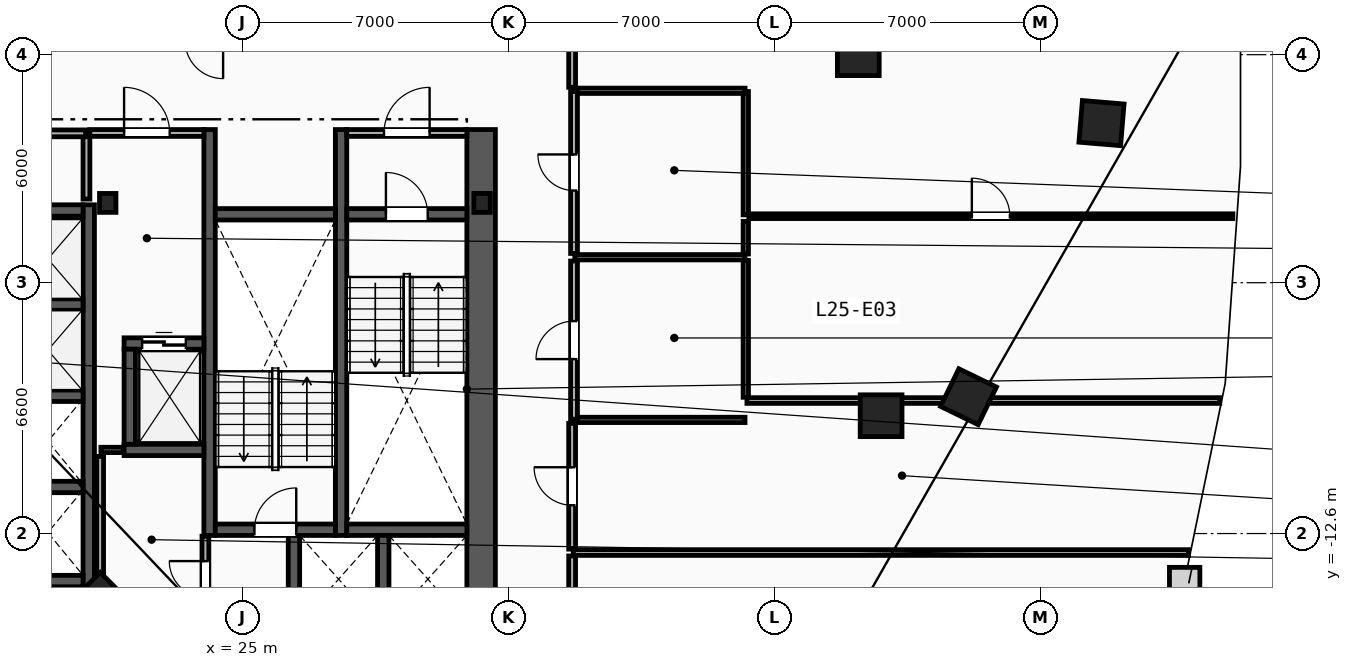
"""IFC4 building model, lengths in metres.
Left out: names, types, materials, properties, quantities, classifications, styles, units other than length and angle.
Written with IfcOpenShell. Run it as: python <this file> out.ifc"""

import sys

from ifc_helpers import new_model, si_unit, direction, frame, frame_2d, origin, origin_2d, place, context, subcontext, project, spatial, rectangle, i_section, extrude, element, fill, save


model = new_model("IFC4")
c1 = context("Model", 3, precision=1e-05, world=origin(), true_north=direction((0.0, 1.0)))
c2 = subcontext(c1, "Body", "Model", "MODEL_VIEW")
j1 = project(units=[si_unit("LENGTHUNIT", "METRE"), si_unit("PLANEANGLEUNIT", "RADIAN")], contexts=[c1])
p1 = place(None, origin())
s1 = spatial("IfcSite", under=j1, at=p1, CompositionType="ELEMENT")
p2 = place(p1, origin())
s2 = spatial("IfcBuilding", under=s1, at=p2, CompositionType="ELEMENT")
p3 = place(p2, frame((0.0, 0.0, 99.8)))
s3 = spatial("IfcBuildingStorey", under=s2, at=p3, CompositionType="ELEMENT", Elevation=99.8)
for number, where, z_axis, x_axis in (
    (1, (31.3, -3.9, 0.0), (0.0, 0.0, 1.0), (1.0, 0.0, 0.0)),
    (2, (21.45, -3.9, 0.0), (0.0, 0.0, 1.0), (1.0, 0.0, 0.0)),
):
    element("IfcColumn", number, at=place(p3, frame(where, z_axis=z_axis, x_axis=x_axis)), inside=s3, PredefinedType="COLUMN", context=c2, shape_type="SweptSolid", body=[
        extrude(i_section(OverallWidth=0.432, OverallDepth=0.498, WebThickness=0.056, FlangeThickness=0.089, FilletRadius=0.018, at=origin_2d()), origin(), (0.0, 0.0, 1.0), 3.6),
    ])
for number, where, z_axis, x_axis in (
    (3, (41.2, 0.0, 0.0), (0.0, 0.0, 1.0), (1.0, 0.0, 0.0)),
    (4, (41.8, -9.5, 0.0), (0.0, 0.0, 1.0), (1.0, 0.0, 0.0)),
    (5, (21.25, -14.4, 0.0), (0.0, 0.0, 1.0), (0.703, -0.711, 0.0)),
    (6, (44.1, -9.0, 0.0), (0.0, 0.0, 1.0), (0.437, 0.899, 0.0)),
    (7, (47.6, -1.8, 0.0), (0.0, 0.0, 1.0), (0.084, 0.997, 0.0)),
):
    element("IfcColumn", number, at=place(p3, frame(where, z_axis=z_axis, x_axis=x_axis)), inside=s3, PredefinedType="COLUMN", context=c2, shape_type="SweptSolid", body=[
        extrude(rectangle(XDim=1.1, YDim=1.1, at=origin_2d()), origin(), (0.0, 0.0, 1.0), 3.6),
    ])
p4 = place(p3, frame((31.275, -15.3, 0.0), z_axis=(0.0, 0.0, 1.0), x_axis=(0.0, 1.0, 0.0)))
e8 = element("IfcWall", 8, at=p4, inside=s3, PredefinedType="SHEAR", context=c2, shape_type="SweptSolid", body=[
    extrude(rectangle(XDim=13.33, YDim=0.75, at=frame_2d((6.665, 0.0))), origin(), (0.0, 0.0, 1.0), 3.3),
])
for number, where, z_axis, x_axis in (
    (9, (27.59, -12.65, 0.0), (0.0, 0.0, 1.0), (0.0, 1.0, 0.0)),
    (10, (24.13, -12.65, 0.0), (0.0, 0.0, 1.0), (0.0, 1.0, 0.0)),
):
    element("IfcWall", number, at=place(p3, frame(where, z_axis=z_axis, x_axis=x_axis)), inside=s3, PredefinedType="SHEAR", context=c2, shape_type="SweptSolid", body=[
        extrude(rectangle(XDim=10.68, YDim=0.3, at=frame_2d((5.34, 0.0))), origin(), (0.0, 0.0, 1.0), 3.3),
    ])
p5 = place(p3, frame((27.74, -4.2, 0.0), z_axis=(0.0, 0.0, 1.0), x_axis=(1.0, 0.0, 0.0)))
e11 = element("IfcWall", 11, at=p5, inside=s3, PredefinedType="SHEAR", context=c2, shape_type="SweptSolid", body=[
    extrude(rectangle(XDim=3.16, YDim=0.3, at=frame_2d((1.58, 0.0))), origin(), (0.0, 0.0, 1.0), 3.3),
])
p6 = place(p5, frame((1.03, 0.0, 0.0)))
e12 = element("IfcOpeningElement", 12, at=p6, cuts=e11, PredefinedType="OPENING", context=c2, shape_type="SweptSolid", body=[
    extrude(rectangle(XDim=1.1, YDim=2.15, at=frame_2d((0.55, 1.075))), frame((0.0, 0.16, 0.0), z_axis=(0.0, -1.0, 0.0), x_axis=(1.0, 0.0, 0.0)), (0.0, 0.0, 1.0), 0.32),
])
p7 = place(p3, frame((27.74, -12.5, 0.0), z_axis=(0.0, 0.0, 1.0), x_axis=(1.0, 0.0, 0.0)))
e13 = element("IfcWall", 13, at=p7, inside=s3, PredefinedType="SHEAR", context=c2, shape_type="SweptSolid", body=[
    extrude(rectangle(XDim=3.16, YDim=0.3, at=frame_2d((1.58, 0.0))), origin(), (0.0, 0.0, 1.0), 3.3),
])
p8 = place(p3, frame((24.28, -12.5, 0.0), z_axis=(0.0, 0.0, 1.0), x_axis=(1.0, 0.0, 0.0)))
e14 = element("IfcWall", 14, at=p8, inside=s3, PredefinedType="SHEAR", context=c2, shape_type="SweptSolid", body=[
    extrude(rectangle(XDim=3.16, YDim=0.3, at=frame_2d((1.58, 0.0))), origin(), (0.0, 0.0, 1.0), 3.3),
])
p9 = place(p8, frame((1.03, 0.0, 0.0)))
e15 = element("IfcOpeningElement", 15, at=p9, cuts=e14, PredefinedType="OPENING", context=c2, shape_type="SweptSolid", body=[
    extrude(rectangle(XDim=1.1, YDim=2.15, at=frame_2d((0.55, 1.075))), frame((0.0, 0.16, 0.0), z_axis=(0.0, -1.0, 0.0), x_axis=(1.0, 0.0, 0.0)), (0.0, 0.0, 1.0), 0.32),
])
p10 = place(p3, frame((24.28, -4.2, 0.0), z_axis=(0.0, 0.0, 1.0), x_axis=(1.0, 0.0, 0.0)))
e16 = element("IfcWall", 16, at=p10, inside=s3, PredefinedType="SHEAR", context=c2, shape_type="SweptSolid", body=[
    extrude(rectangle(XDim=3.16, YDim=0.3, at=frame_2d((1.58, 0.0))), origin(), (0.0, 0.0, 1.0), 3.3),
])
p11 = place(p3, frame((20.89, -3.8, 0.0), z_axis=(0.0, 0.0, 1.0), x_axis=(0.0, 1.0, 0.0)))
e17 = element("IfcWall", 17, at=p11, inside=s3, PredefinedType="PARTITIONING", context=c2, shape_type="SweptSolid", body=[
    extrude(rectangle(XDim=1.65, YDim=0.18, at=frame_2d((0.825, 0.0))), origin(), (0.0, 0.0, 1.0), 3.3),
])
p12 = place(p3, frame((20.98, -2.06, 0.0), z_axis=(0.0, 0.0, 1.0), x_axis=(1.0, 0.0, 0.0)))
e18 = element("IfcWall", 18, at=p12, inside=s3, PredefinedType="PARTITIONING", context=c2, shape_type="SweptSolid", body=[
    extrude(rectangle(XDim=3.0, YDim=0.18, at=frame_2d((1.5, 0.0))), origin(), (0.0, 0.0, 1.0), 3.3),
])
p13 = place(p12, frame((0.9, 0.0, 0.0)))
e19 = element("IfcOpeningElement", 19, at=p13, cuts=e18, PredefinedType="OPENING", context=c2, shape_type="SweptSolid", body=[
    extrude(rectangle(XDim=1.2, YDim=2.15, at=frame_2d((0.6, 1.075))), frame((0.0, 0.1, 0.0), z_axis=(0.0, -1.0, 0.0), x_axis=(1.0, 0.0, 0.0)), (0.0, 0.0, 1.0), 0.2),
])
p14 = place(p3, frame((27.74, -2.06, 0.0), z_axis=(0.0, 0.0, 1.0), x_axis=(1.0, 0.0, 0.0)))
e20 = element("IfcWall", 20, at=p14, inside=s3, PredefinedType="PARTITIONING", context=c2, shape_type="SweptSolid", body=[
    extrude(rectangle(XDim=3.16, YDim=0.18, at=frame_2d((1.58, 0.0))), origin(), (0.0, 0.0, 1.0), 3.3),
])
p15 = place(p14, frame((0.98, 0.0, 0.0)))
e21 = element("IfcOpeningElement", 21, at=p15, cuts=e20, PredefinedType="OPENING", context=c2, shape_type="SweptSolid", body=[
    extrude(rectangle(XDim=1.2, YDim=2.15, at=frame_2d((0.6, 1.075))), frame((0.0, 0.1, 0.0), z_axis=(0.0, -1.0, 0.0), x_axis=(1.0, 0.0, 0.0)), (0.0, 0.0, 1.0), 0.2),
])
p16 = place(p3, frame((21.88, -7.6, 0.0), z_axis=(0.0, 0.0, 1.0), x_axis=(1.0, 0.0, 0.0)))
e22 = element("IfcWall", 22, at=p16, inside=s3, PredefinedType="SHEAR", context=c2, shape_type="SweptSolid", body=[
    extrude(rectangle(XDim=2.1, YDim=0.3, at=frame_2d((1.05, 0.0))), origin(), (0.0, 0.0, 1.0), 3.3),
])
p17 = place(p16, frame((0.475, 0.0, 0.0)))
e23 = element("IfcOpeningElement", 23, at=p17, cuts=e22, PredefinedType="OPENING", context=c2, shape_type="SweptSolid", body=[
    extrude(rectangle(XDim=1.15, YDim=2.2, at=frame_2d((0.575, 1.1))), frame((0.0, 0.16, 0.0), z_axis=(0.0, -1.0, 0.0), x_axis=(1.0, 0.0, 0.0)), (0.0, 0.0, 1.0), 0.32),
])
p18 = place(p3, frame((21.88, -10.4, 0.0), z_axis=(0.0, 0.0, 1.0), x_axis=(1.0, 0.0, 0.0)))
e24 = element("IfcWall", 24, at=p18, inside=s3, PredefinedType="SHEAR", context=c2, shape_type="SweptSolid", body=[
    extrude(rectangle(XDim=2.1, YDim=0.3, at=frame_2d((1.05, 0.0))), origin(), (0.0, 0.0, 1.0), 3.3),
])
p19 = place(p3, frame((22.03, -10.25, 0.0), z_axis=(0.0, 0.0, 1.0), x_axis=(0.0, 1.0, 0.0)))
e25 = element("IfcWall", 25, at=p19, inside=s3, PredefinedType="SHEAR", context=c2, shape_type="SweptSolid", body=[
    extrude(rectangle(XDim=2.5, YDim=0.3, at=frame_2d((1.25, 0.0))), origin(), (0.0, 0.0, 1.0), 3.3),
])
for number, where, z_axis, x_axis in (
    (26, (28.7, -14.95, 0.0), (0.0, 0.0, 1.0), (0.0, 1.0, 0.0)),
    (27, (26.35, -14.95, 0.0), (0.0, 0.0, 1.0), (0.0, 1.0, 0.0)),
):
    element("IfcWall", number, at=place(p3, frame(where, z_axis=z_axis, x_axis=x_axis)), inside=s3, PredefinedType="SHEAR", context=c2, shape_type="SweptSolid", body=[
        extrude(rectangle(XDim=2.3, YDim=0.3, at=frame_2d((1.15, 0.0))), origin(), (0.0, 0.0, 1.0), 3.3),
    ])
p20 = place(p3, frame((20.95, -14.0, 0.0), z_axis=(0.0, 0.0, 1.0), x_axis=(0.0, 1.0, 0.0)))
e28 = element("IfcWall", 28, at=p20, inside=s3, PredefinedType="SHEAR", context=c2, shape_type="SweptSolid", body=[
    extrude(rectangle(XDim=10.05, YDim=0.3, at=frame_2d((5.025, 0.0))), origin(), (0.0, 0.0, 1.0), 3.3),
])
p21 = place(p3, frame((18.95, -13.85, 0.0), z_axis=(0.0, 0.0, 1.0), x_axis=(1.0, 0.0, 0.0)))
e29 = element("IfcWall", 29, at=p21, inside=s3, PredefinedType="SHEAR", context=c2, shape_type="SweptSolid", body=[
    extrude(rectangle(XDim=1.85, YDim=0.3, at=frame_2d((0.925, 0.0))), origin(), (0.0, 0.0, 1.0), 3.3),
])
p22 = place(p3, frame((18.65, -4.1, 0.0), z_axis=(0.0, 0.0, 1.0), x_axis=(1.0, 0.0, 0.0)))
e30 = element("IfcWall", 30, at=p22, inside=s3, PredefinedType="SHEAR", context=c2, shape_type="SweptSolid", body=[
    extrude(rectangle(XDim=2.15, YDim=0.3, at=frame_2d((1.075, 0.0))), origin(), (0.0, 0.0, 1.0), 3.3),
])
for number, where, z_axis, x_axis in (
    (31, (18.95, -11.375, 0.0), (0.0, 0.0, 1.0), (1.0, 0.0, 0.0)),
    (32, (18.95, -8.975, 0.0), (0.0, 0.0, 1.0), (1.0, 0.0, 0.0)),
    (33, (18.95, -6.575, 0.0), (0.0, 0.0, 1.0), (1.0, 0.0, 0.0)),
):
    element("IfcWall", number, at=place(p3, frame(where, z_axis=z_axis, x_axis=x_axis)), inside=s3, PredefinedType="SHEAR", context=c2, shape_type="SweptSolid", body=[
        extrude(rectangle(XDim=1.85, YDim=0.3, at=frame_2d((0.925, 0.0))), origin(), (0.0, 0.0, 1.0), 3.3),
    ])
p23 = place(p3, frame((17.12, -2.07, 0.0), z_axis=(0.0, 0.0, 1.0), x_axis=(1.0, 0.0, 0.0)))
e34 = element("IfcWall", 34, at=p23, inside=s3, PredefinedType="PARTITIONING", context=c2, shape_type="SweptSolid", body=[
    extrude(rectangle(XDim=3.75, YDim=0.18, at=frame_2d((1.875, 0.0))), origin(), (0.0, 0.0, 1.0), 3.3),
])
p24 = place(p23, frame((1.4, 0.0, 0.0)))
e35 = element("IfcOpeningElement", 35, at=p24, cuts=e34, PredefinedType="OPENING", context=c2, shape_type="SweptSolid", body=[
    extrude(rectangle(XDim=0.95, YDim=2.1, at=frame_2d((0.475, 1.05))), frame((0.0, 0.1, 0.0), z_axis=(0.0, -1.0, 0.0), x_axis=(1.0, 0.0, 0.0)), (0.0, 0.0, 1.0), 0.2),
])
p25 = place(p3, frame((21.27, -10.4, 0.0), z_axis=(0.0, 0.0, 1.0), x_axis=(1.0, 0.0, 0.0)))
e36 = element("IfcWall", 36, at=p25, inside=s3, PredefinedType="PARTITIONING", context=c2, shape_type="SweptSolid", body=[
    extrude(rectangle(XDim=0.59, YDim=0.14, at=frame_2d((0.295, 0.0))), origin(), (0.0, 0.0, 1.0), 3.3),
])
p26 = place(p3, frame((21.25, -14.93, 0.0), z_axis=(0.0, 0.0, 1.0), x_axis=(0.0, 1.0, 0.0)))
e37 = element("IfcWall", 37, at=p26, inside=s3, PredefinedType="PARTITIONING", context=c2, shape_type="SweptSolid", body=[
    extrude(rectangle(XDim=4.36, YDim=0.18, at=frame_2d((2.18, 0.0))), origin(), (0.0, 0.0, 1.0), 3.3),
])
p27 = place(p3, frame((24.02, -14.93, 0.0), z_axis=(0.0, 0.0, 1.0), x_axis=(0.0, 1.0, 0.0)))
e38 = element("IfcWall", 38, at=p27, inside=s3, PredefinedType="PARTITIONING", context=c2, shape_type="SweptSolid", body=[
    extrude(rectangle(XDim=2.26, YDim=0.18, at=frame_2d((1.13, 0.0))), origin(), (0.0, 0.0, 1.0), 3.3),
])
p28 = place(p27, frame((0.655, 0.0, 0.0)))
e39 = element("IfcOpeningElement", 39, at=p28, cuts=e38, PredefinedType="OPENING", context=c2, shape_type="SweptSolid", body=[
    extrude(rectangle(XDim=0.95, YDim=2.1, at=frame_2d((0.475, 1.05))), frame((0.0, 0.1, 0.0), z_axis=(0.0, -1.0, 0.0), x_axis=(1.0, 0.0, 0.0)), (0.0, 0.0, 1.0), 0.2),
])
p29 = place(p3, frame((38.24, -9.015, 0.0), z_axis=(0.0, 0.0, 1.0), x_axis=(0.0, 1.0, 0.0)))
e40 = element("IfcWall", 40, at=p29, inside=s3, PredefinedType="PARTITIONING", context=c2, shape_type="SweptSolid", body=[
    extrude(rectangle(XDim=3.6, YDim=0.14, at=frame_2d((1.8, 0.0))), origin(), (0.0, 0.0, 1.0), 3.3),
])
p30 = place(p3, frame((38.24, -5.245, 0.0), z_axis=(0.0, 0.0, 1.0), x_axis=(0.0, 1.0, 0.0)))
e41 = element("IfcWall", 41, at=p30, inside=s3, PredefinedType="PARTITIONING", context=c2, shape_type="SweptSolid", body=[
    extrude(rectangle(XDim=0.86, YDim=0.14, at=frame_2d((0.43, 0.0))), origin(), (0.0, 0.0, 1.0), 3.3),
])
p31 = place(p3, frame((38.24, -4.215, 0.0), z_axis=(0.0, 0.0, 1.0), x_axis=(0.0, 1.0, 0.0)))
e42 = element("IfcWall", 42, at=p31, inside=s3, PredefinedType="PARTITIONING", context=c2, shape_type="SweptSolid", body=[
    extrude(rectangle(XDim=3.245, YDim=0.14, at=frame_2d((1.623, 0.0))), origin(), (0.0, 0.0, 1.0), 3.3),
])
for number, where, z_axis, x_axis in (
    (43, (33.74, -0.95, 0.0), (0.0, 0.0, 1.0), (1.0, 0.0, 0.0)),
    (44, (33.74, -5.33, 0.0), (0.0, 0.0, 1.0), (1.0, 0.0, 0.0)),
    (45, (33.74, -9.61, 0.0), (0.0, 0.0, 1.0), (1.0, 0.0, 0.0)),
):
    element("IfcWall", number, at=place(p3, frame(where, z_axis=z_axis, x_axis=x_axis)), inside=s3, PredefinedType="PARTITIONING", context=c2, shape_type="SweptSolid", body=[
        extrude(rectangle(XDim=4.48, YDim=0.14, at=frame_2d((2.24, 0.0))), origin(), (0.0, 0.0, 1.0), 3.3),
    ])
p32 = place(p3, frame((33.72, -5.23, 0.0), z_axis=(0.0, 0.0, 1.0), x_axis=(0.0, 1.0, 0.0)))
e46 = element("IfcWall", 46, at=p32, inside=s3, PredefinedType="PARTITIONING", context=c2, shape_type="SweptSolid", body=[
    extrude(rectangle(XDim=4.26, YDim=0.18, at=frame_2d((2.13, 0.0))), origin(), (0.0, 0.0, 1.0), 3.3),
])
p33 = place(p32, frame((1.655, 0.0, 0.0)))
e47 = element("IfcOpeningElement", 47, at=p33, cuts=e46, PredefinedType="OPENING", context=c2, shape_type="SweptSolid", body=[
    extrude(rectangle(XDim=0.95, YDim=2.1, at=frame_2d((0.475, 1.05))), frame((0.0, 0.1, 0.0), z_axis=(0.0, -1.0, 0.0), x_axis=(1.0, 0.0, 0.0)), (0.0, 0.0, 1.0), 0.2),
])
p34 = place(p3, frame((33.72, -9.59, 0.0), z_axis=(0.0, 0.0, 1.0), x_axis=(0.0, 1.0, 0.0)))
e48 = element("IfcWall", 48, at=p34, inside=s3, PredefinedType="PARTITIONING", context=c2, shape_type="SweptSolid", body=[
    extrude(rectangle(XDim=4.16, YDim=0.18, at=frame_2d((2.08, 0.0))), origin(), (0.0, 0.0, 1.0), 3.3),
])
p35 = place(p34, frame((1.58, 0.0, 0.0)))
e49 = element("IfcOpeningElement", 49, at=p35, cuts=e48, PredefinedType="OPENING", context=c2, shape_type="SweptSolid", body=[
    extrude(rectangle(XDim=1.0, YDim=2.15, at=frame_2d((0.5, 1.075))), frame((0.0, 0.1, 0.0), z_axis=(0.0, -1.0, 0.0), x_axis=(1.0, 0.0, 0.0)), (0.0, 0.0, 1.0), 0.2),
])
p36 = place(p3, frame((38.27, -9.1, 0.0), z_axis=(0.0, 0.0, 1.0), x_axis=(1.0, 0.0, 0.0)))
e50 = element("IfcWall", 50, at=p36, inside=s3, PredefinedType="PARTITIONING", context=c2, shape_type="SweptSolid", body=[
    extrude(rectangle(XDim=12.442, YDim=0.15, at=frame_2d((6.221, 0.0))), origin(), (0.0, 0.0, 1.0), 3.3),
])
p37 = place(p3, frame((33.7, -13.1, 0.0), z_axis=(0.0, 0.0, 1.0), x_axis=(1.0, 0.0, 0.0)))
e51 = element("IfcWall", 51, at=p37, inside=s3, PredefinedType="PARTITIONING", context=c2, shape_type="SweptSolid", body=[
    extrude(rectangle(XDim=16.19, YDim=0.15, at=frame_2d((8.095, 0.0))), origin(), (0.0, 0.0, 1.0), 3.3),
])
p38 = place(p3, frame((33.67, -17.428, 0.0), z_axis=(0.0, 0.0, 1.0), x_axis=(0.0, 1.0, 0.0)))
e52 = element("IfcWall", 52, at=p38, inside=s3, PredefinedType="PARTITIONING", context=c2, shape_type="SweptSolid", body=[
    extrude(rectangle(XDim=4.239, YDim=0.18, at=frame_2d((2.119, 0.0))), origin(), (0.0, 0.0, 1.0), 3.3),
])
p39 = place(p38, frame((1.619, 0.0, 0.0)))
e53 = element("IfcOpeningElement", 53, at=p39, cuts=e52, PredefinedType="OPENING", context=c2, shape_type="SweptSolid", body=[
    extrude(rectangle(XDim=1.0, YDim=2.15, at=frame_2d((0.5, 1.075))), frame((0.0, 0.1, 0.0), z_axis=(0.0, -1.0, 0.0), x_axis=(1.0, 0.0, 0.0)), (0.0, 0.0, 1.0), 0.2),
])
p40 = place(p3, frame((33.67, -13.01, 0.0), z_axis=(0.0, 0.0, 1.0), x_axis=(0.0, 1.0, 0.0)))
e54 = element("IfcWall", 54, at=p40, inside=s3, PredefinedType="PARTITIONING", context=c2, shape_type="SweptSolid", body=[
    extrude(rectangle(XDim=3.309, YDim=0.18, at=frame_2d((1.654, 0.0))), origin(), (0.0, 0.0, 1.0), 3.3),
])
p41 = place(p40, frame((1.154, 0.0, 0.0)))
e55 = element("IfcOpeningElement", 55, at=p41, cuts=e54, PredefinedType="OPENING", context=c2, shape_type="SweptSolid", body=[
    extrude(rectangle(XDim=1.0, YDim=2.15, at=frame_2d((0.5, 1.075))), frame((0.0, 0.1, 0.0), z_axis=(0.0, -1.0, 0.0), x_axis=(1.0, 0.0, 0.0)), (0.0, 0.0, 1.0), 0.2),
])
p42 = place(p3, frame((33.67, -0.859, 0.0), z_axis=(0.0, 0.0, 1.0), x_axis=(0.0, 1.0, 0.0)))
e56 = element("IfcWall", 56, at=p42, inside=s3, PredefinedType="PARTITIONING", context=c2, shape_type="SweptSolid", body=[
    extrude(rectangle(XDim=10.389, YDim=0.18, at=frame_2d((5.194, 0.0))), origin(), (0.0, 0.0, 1.0), 3.3),
])
p43 = place(p42, frame((4.694, 0.0, 0.0)))
e57 = element("IfcOpeningElement", 57, at=p43, cuts=e56, PredefinedType="OPENING", context=c2, shape_type="SweptSolid", body=[
    extrude(rectangle(XDim=1.0, YDim=2.15, at=frame_2d((0.5, 1.075))), frame((0.0, 0.1, 0.0), z_axis=(0.0, -1.0, 0.0), x_axis=(1.0, 0.0, 0.0)), (0.0, 0.0, 1.0), 0.2),
])
p44 = place(p3, frame((38.32, -4.25, 0.0), z_axis=(0.0, 0.0, 1.0), x_axis=(1.0, 0.0, 0.0)))
e58 = element("IfcWall", 58, at=p44, inside=s3, PredefinedType="PARTITIONING", context=c2, shape_type="SweptSolid", body=[
    extrude(rectangle(XDim=12.737, YDim=0.125, at=frame_2d((6.368, 0.0))), origin(), (0.0, 0.0, 1.0), 3.3),
])
p45 = place(p44, frame((5.868, 0.0, 0.0)))
e59 = element("IfcOpeningElement", 59, at=p45, cuts=e58, PredefinedType="OPENING", context=c2, shape_type="SweptSolid", body=[
    extrude(rectangle(XDim=1.0, YDim=2.15, at=frame_2d((0.5, 1.075))), frame((0.0, 0.073, 0.0), z_axis=(0.0, -1.0, 0.0), x_axis=(1.0, 0.0, 0.0)), (0.0, 0.0, 1.0), 0.145),
])
p46 = place(p6, origin())
e60 = element("IfcDoor", 60, at=p46, inside=s3, OperationType="SINGLE_SWING_LEFT", PredefinedType="DOOR", context=c2, shape_type="SweptSolid", body=[
    extrude(rectangle(XDim=1.1, YDim=2.15, at=frame_2d((0.55, 1.075))), frame((0.0, 0.025, 0.0), z_axis=(0.0, -1.0, 0.0), x_axis=(1.0, 0.0, 0.0)), (0.0, 0.0, 1.0), 0.05),
])
fill(e12, e60)
p47 = place(p9, origin())
e61 = element("IfcDoor", 61, at=p47, inside=s3, OperationType="SINGLE_SWING_RIGHT", PredefinedType="DOOR", context=c2, shape_type="SweptSolid", body=[
    extrude(rectangle(XDim=1.1, YDim=2.15, at=frame_2d((0.55, 1.075))), frame((0.0, 0.025, 0.0), z_axis=(0.0, -1.0, 0.0), x_axis=(1.0, 0.0, 0.0)), (0.0, 0.0, 1.0), 0.05),
])
fill(e15, e61)
p48 = place(p13, origin())
e62 = element("IfcDoor", 62, at=p48, inside=s3, OperationType="SINGLE_SWING_LEFT", PredefinedType="DOOR", context=c2, shape_type="SweptSolid", body=[
    extrude(rectangle(XDim=1.2, YDim=2.15, at=frame_2d((0.6, 1.075))), frame((0.0, 0.025, 0.0), z_axis=(0.0, -1.0, 0.0), x_axis=(1.0, 0.0, 0.0)), (0.0, 0.0, 1.0), 0.05),
])
fill(e19, e62)
p49 = place(p15, origin())
e63 = element("IfcDoor", 63, at=p49, inside=s3, OperationType="SINGLE_SWING_RIGHT", PredefinedType="DOOR", context=c2, shape_type="SweptSolid", body=[
    extrude(rectangle(XDim=1.2, YDim=2.15, at=frame_2d((0.6, 1.075))), frame((0.0, 0.025, 0.0), z_axis=(0.0, -1.0, 0.0), x_axis=(1.0, 0.0, 0.0)), (0.0, 0.0, 1.0), 0.05),
])
fill(e21, e63)
p50 = place(p17, origin())
e64 = element("IfcDoor", 64, at=p50, inside=s3, OperationType="SLIDING_TO_LEFT", PredefinedType="TRAPDOOR", context=c2, shape_type="SweptSolid", body=[
    extrude(rectangle(XDim=1.15, YDim=2.2, at=frame_2d((0.575, 1.1))), frame((0.0, 0.025, 0.0), z_axis=(0.0, -1.0, 0.0), x_axis=(1.0, 0.0, 0.0)), (0.0, 0.0, 1.0), 0.05),
])
fill(e23, e64)
p51 = place(p45, origin())
e65 = element("IfcDoor", 65, at=p51, inside=s3, OperationType="SINGLE_SWING_LEFT", PredefinedType="DOOR", context=c2, shape_type="SweptSolid", body=[
    extrude(rectangle(XDim=1.0, YDim=2.15, at=frame_2d((0.5, 1.075))), frame((0.0, 0.025, 0.0), z_axis=(0.0, -1.0, 0.0), x_axis=(1.0, 0.0, 0.0)), (0.0, 0.0, 1.0), 0.05),
])
fill(e59, e65)
p52 = place(p33, origin())
e66 = element("IfcDoor", 66, at=p52, inside=s3, OperationType="SINGLE_SWING_RIGHT", PredefinedType="DOOR", context=c2, shape_type="SweptSolid", body=[
    extrude(rectangle(XDim=0.95, YDim=2.1, at=frame_2d((0.475, 1.05))), frame((0.0, 0.025, 0.0), z_axis=(0.0, -1.0, 0.0), x_axis=(1.0, 0.0, 0.0)), (0.0, 0.0, 1.0), 0.05),
])
fill(e47, e66)
p53 = place(p35, origin())
e67 = element("IfcDoor", 67, at=p53, inside=s3, OperationType="SINGLE_SWING_LEFT", PredefinedType="DOOR", context=c2, shape_type="SweptSolid", body=[
    extrude(rectangle(XDim=1.0, YDim=2.15, at=frame_2d((0.5, 1.075))), frame((0.0, 0.025, 0.0), z_axis=(0.0, -1.0, 0.0), x_axis=(1.0, 0.0, 0.0)), (0.0, 0.0, 1.0), 0.05),
])
fill(e49, e67)
p54 = place(p41, origin())
e68 = element("IfcDoor", 68, at=p54, inside=s3, OperationType="SINGLE_SWING_RIGHT", PredefinedType="DOOR", context=c2, shape_type="SweptSolid", body=[
    extrude(rectangle(XDim=1.0, YDim=2.15, at=frame_2d((0.5, 1.075))), frame((0.0, 0.025, 0.0), z_axis=(0.0, -1.0, 0.0), x_axis=(1.0, 0.0, 0.0)), (0.0, 0.0, 1.0), 0.05),
])
fill(e55, e68)
p55 = place(p28, origin())
e69 = element("IfcDoor", 69, at=p55, inside=s3, OperationType="SINGLE_SWING_RIGHT", PredefinedType="DOOR", context=c2, shape_type="SweptSolid", body=[
    extrude(rectangle(XDim=0.95, YDim=2.1, at=frame_2d((0.475, 1.05))), frame((0.0, 0.025, 0.0), z_axis=(0.0, -1.0, 0.0), x_axis=(1.0, 0.0, 0.0)), (0.0, 0.0, 1.0), 0.05),
])
fill(e39, e69)
save(model, sys.argv[1])
